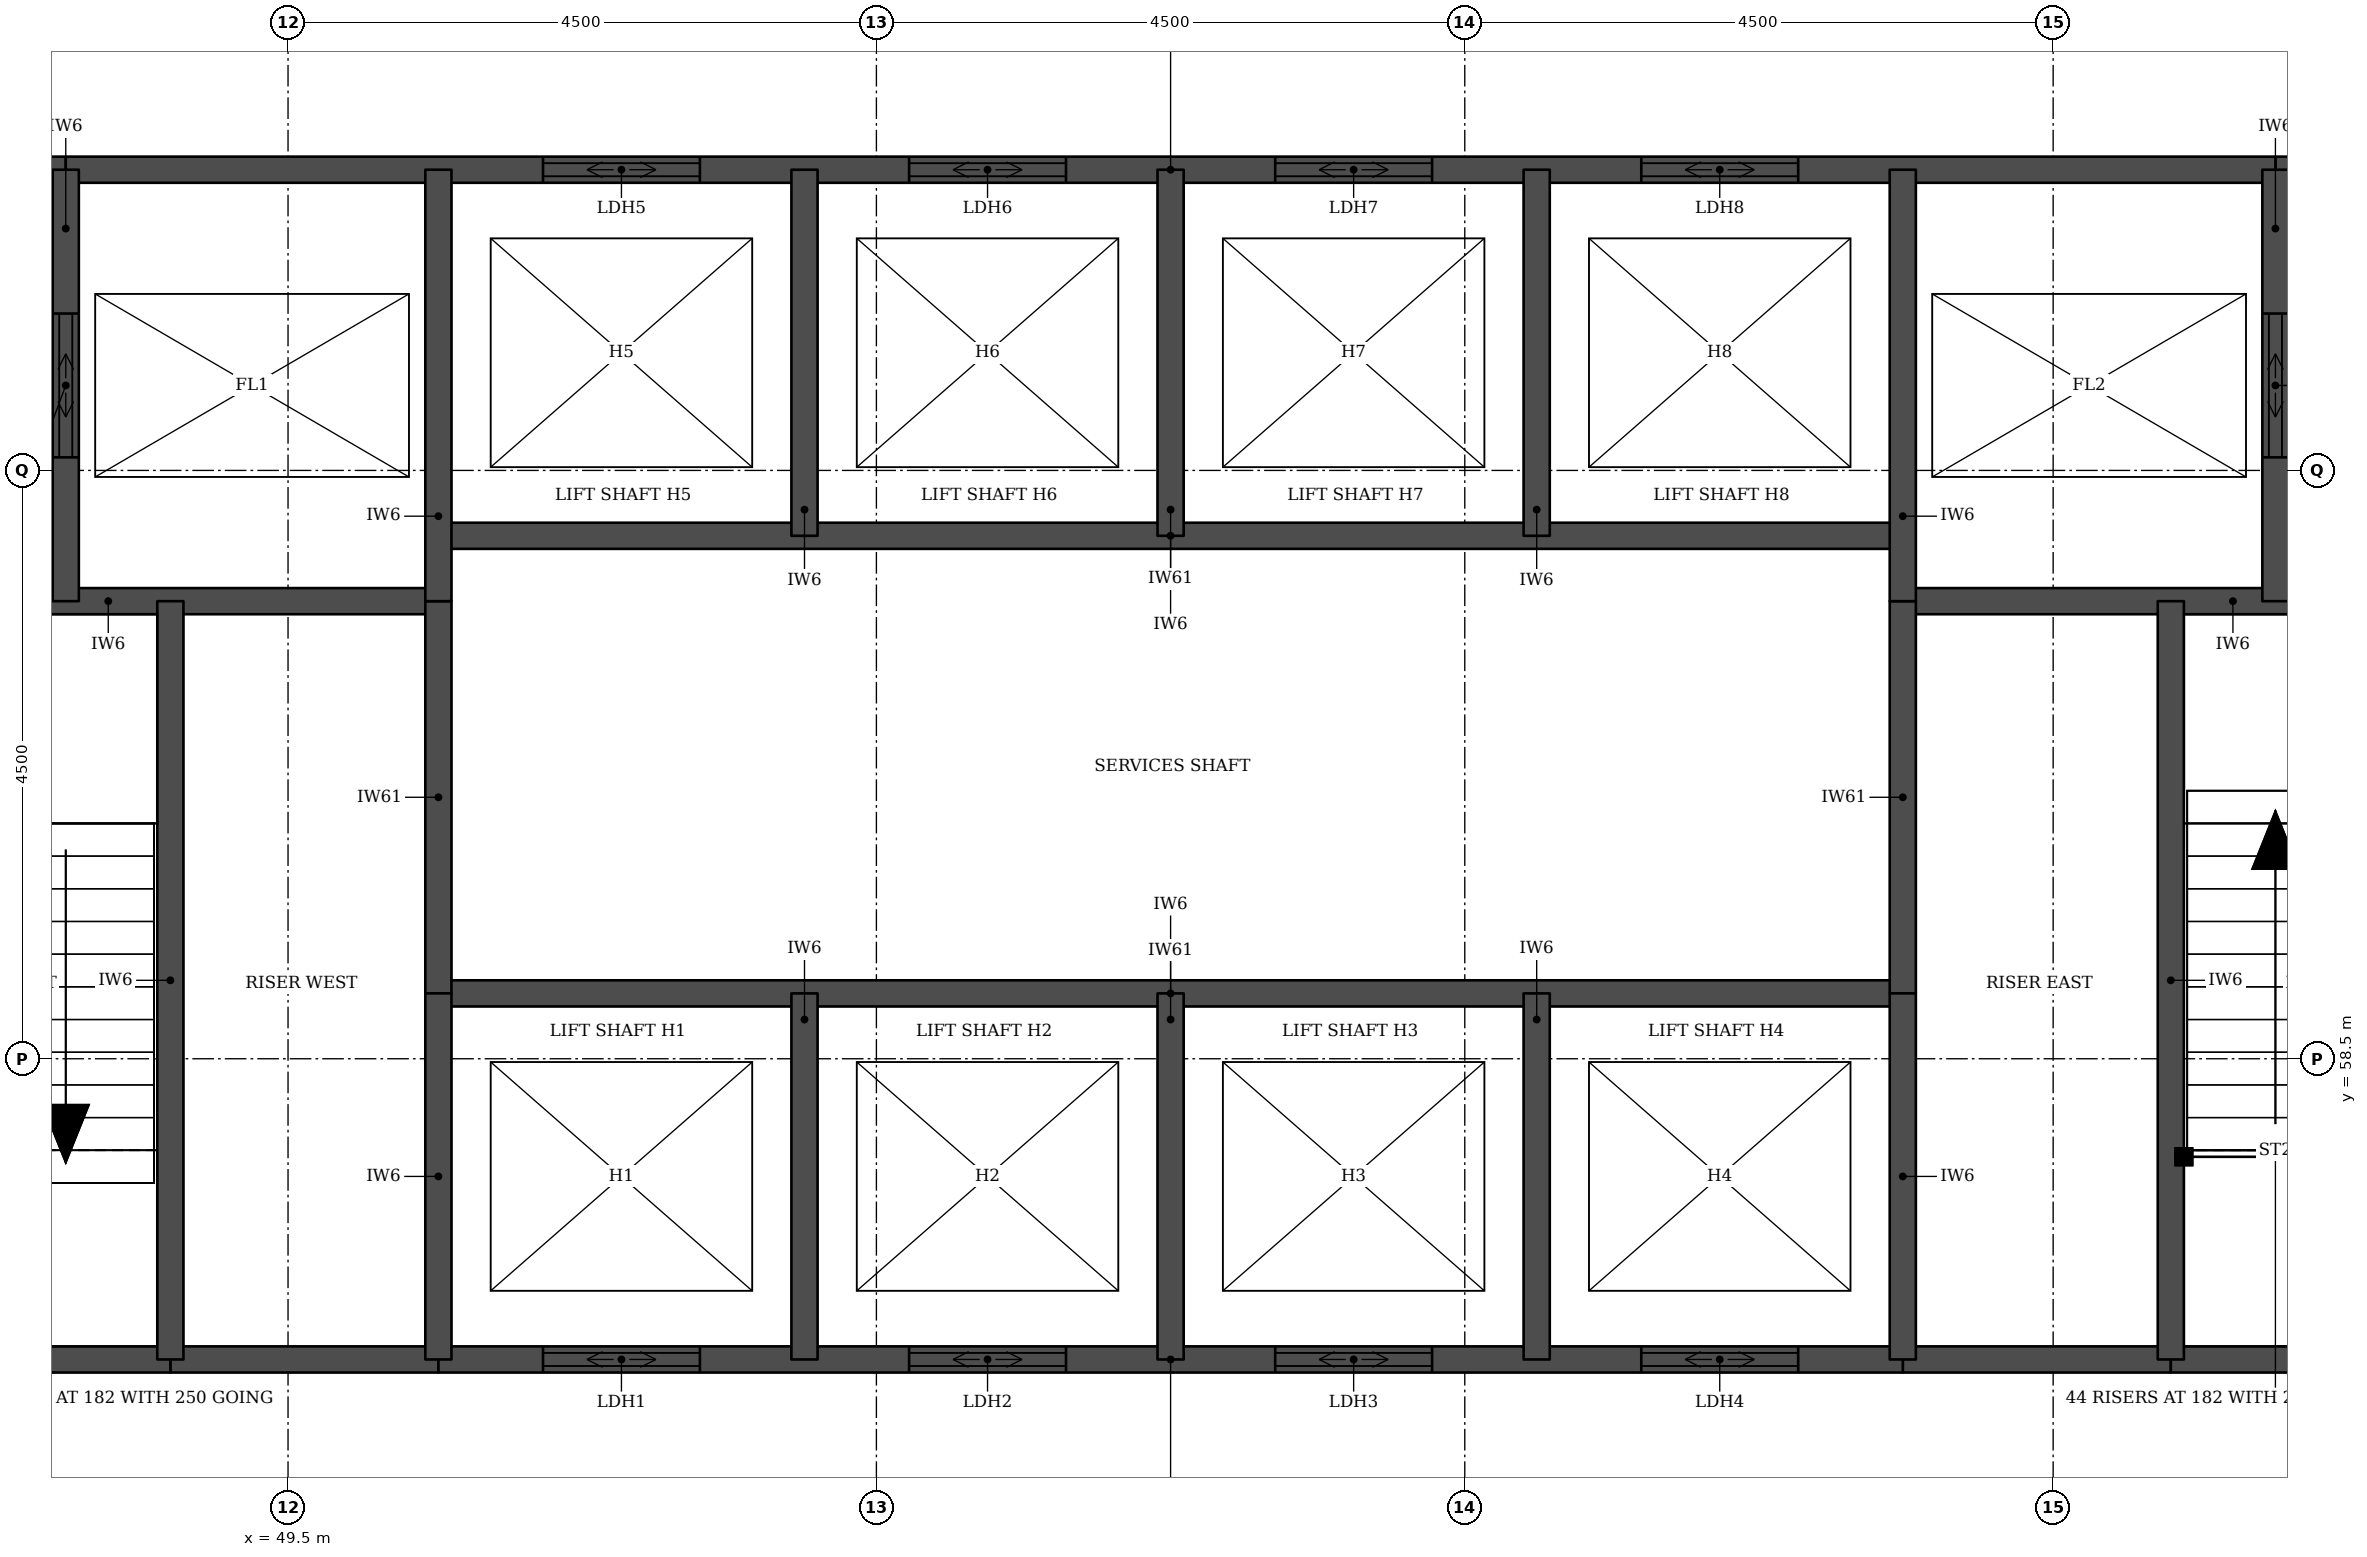
"""IFC4 building model, lengths in metres.
Left out: names, types, materials, properties, quantities, classifications, styles, units other than length and angle.
Written with IfcOpenShell. Run it as: python <this file> out.ifc"""

import sys

from ifc_helpers import new_model, si_unit, direction, frame, frame_2d, origin, place, context, subcontext, project, spatial, rectangle, extrude, element, fill, save


model = new_model("IFC4")
c1 = context("Model", 3, precision=1e-05, world=origin(), true_north=direction((0.0, 1.0)))
c2 = subcontext(c1, "Body", "Model", "MODEL_VIEW")
j1 = project(units=[si_unit("LENGTHUNIT", "METRE"), si_unit("PLANEANGLEUNIT", "RADIAN")], contexts=[c1])
p1 = place(None, origin())
s1 = spatial("IfcSite", under=j1, at=p1, CompositionType="ELEMENT")
p2 = place(p1, origin())
s2 = spatial("IfcBuilding", under=s1, at=p2, CompositionType="ELEMENT")
p3 = place(p2, origin())
s3 = spatial("IfcBuildingStorey", under=s2, at=p3, CompositionType="ELEMENT", Elevation=0.0)
for number, where, z_axis, x_axis in (
    (1, (48.6, 56.2, 0.0), (0.0, 0.0, 1.0), (1.0, 0.0, 0.0)),
    (2, (61.85, 56.2, 0.0), (0.0, 0.0, 1.0), (1.0, 0.0, 0.0)),
):
    element("IfcWall", number, at=place(p3, frame(where, z_axis=z_axis, x_axis=x_axis)), inside=s3, PredefinedType="SOLIDWALL", context=c2, shape_type="SweptSolid", body=[
        extrude(rectangle(XDim=2.05, YDim=0.2, at=frame_2d((1.025, 0.0))), origin(), (0.0, 0.0, 1.0), 7.65),
    ])
p4 = place(p3, frame((45.6, 56.2, 0.0), z_axis=(0.0, 0.0, 1.0), x_axis=(1.0, 0.0, 0.0)))
e3 = element("IfcWall", 3, at=p4, inside=s3, PredefinedType="SOLIDWALL", context=c2, shape_type="SweptSolid", body=[
    extrude(rectangle(XDim=3.0, YDim=0.2, at=frame_2d((1.5, 0.0))), origin(), (0.0, 0.0, 1.0), 7.65),
])
p5 = place(p3, frame((50.65, 56.2, 0.0), z_axis=(0.0, 0.0, 1.0), x_axis=(1.0, 0.0, 0.0)))
e4 = element("IfcWall", 4, at=p5, inside=s3, PredefinedType="SOLIDWALL", context=c2, shape_type="SweptSolid", body=[
    extrude(rectangle(XDim=11.2, YDim=0.2, at=frame_2d((5.6, 0.0))), origin(), (0.0, 0.0, 1.0), 7.65),
])
p6 = place(p5, frame((0.8, 0.0, 0.0)))
e5 = element("IfcOpeningElement", 5, at=p6, cuts=e4, PredefinedType="OPENING", context=c2, shape_type="SweptSolid", body=[
    extrude(rectangle(XDim=1.2, YDim=2.1, at=frame_2d((0.6, 1.05))), frame((0.0, 0.11, 0.0), z_axis=(0.0, -1.0, 0.0), x_axis=(1.0, 0.0, 0.0)), (0.0, 0.0, 1.0), 0.22),
])
p7 = place(p5, frame((3.6, 0.0, 0.0)))
e6 = element("IfcOpeningElement", 6, at=p7, cuts=e4, PredefinedType="OPENING", context=c2, shape_type="SweptSolid", body=[
    extrude(rectangle(XDim=1.2, YDim=2.1, at=frame_2d((0.6, 1.05))), frame((0.0, 0.11, 0.0), z_axis=(0.0, -1.0, 0.0), x_axis=(1.0, 0.0, 0.0)), (0.0, 0.0, 1.0), 0.22),
])
p8 = place(p5, frame((6.4, 0.0, 0.0)))
e7 = element("IfcOpeningElement", 7, at=p8, cuts=e4, PredefinedType="OPENING", context=c2, shape_type="SweptSolid", body=[
    extrude(rectangle(XDim=1.2, YDim=2.1, at=frame_2d((0.6, 1.05))), frame((0.0, 0.11, 0.0), z_axis=(0.0, -1.0, 0.0), x_axis=(1.0, 0.0, 0.0)), (0.0, 0.0, 1.0), 0.22),
])
p9 = place(p5, frame((9.2, 0.0, 0.0)))
e8 = element("IfcOpeningElement", 8, at=p9, cuts=e4, PredefinedType="OPENING", context=c2, shape_type="SweptSolid", body=[
    extrude(rectangle(XDim=1.2, YDim=2.1, at=frame_2d((0.6, 1.05))), frame((0.0, 0.11, 0.0), z_axis=(0.0, -1.0, 0.0), x_axis=(1.0, 0.0, 0.0)), (0.0, 0.0, 1.0), 0.22),
])
p10 = place(p3, frame((63.9, 56.2, 0.0), z_axis=(0.0, 0.0, 1.0), x_axis=(1.0, 0.0, 0.0)))
e9 = element("IfcWall", 9, at=p10, inside=s3, PredefinedType="SOLIDWALL", context=c2, shape_type="SweptSolid", body=[
    extrude(rectangle(XDim=3.0, YDim=0.2, at=frame_2d((1.5, 0.0))), origin(), (0.0, 0.0, 1.0), 7.65),
])
p11 = place(p3, frame((50.65, 59.0, 0.0), z_axis=(0.0, 0.0, 1.0), x_axis=(1.0, 0.0, 0.0)))
e10 = element("IfcWall", 10, at=p11, inside=s3, PredefinedType="SOLIDWALL", context=c2, shape_type="SweptSolid", body=[
    extrude(rectangle(XDim=11.2, YDim=0.2, at=frame_2d((5.6, 0.0))), origin(), (0.0, 0.0, 1.0), 8.0),
])
for number, where, z_axis, x_axis in (
    (11, (45.6, 62.0, 0.0), (0.0, 0.0, 1.0), (1.0, 0.0, 0.0)),
    (12, (61.85, 62.0, 0.0), (0.0, 0.0, 1.0), (1.0, 0.0, 0.0)),
):
    element("IfcWall", number, at=place(p3, frame(where, z_axis=z_axis, x_axis=x_axis)), inside=s3, PredefinedType="SOLIDWALL", context=c2, shape_type="SweptSolid", body=[
        extrude(rectangle(XDim=5.05, YDim=0.2, at=frame_2d((2.525, 0.0))), origin(), (0.0, 0.0, 1.0), 7.65),
    ])
p12 = place(p3, frame((50.65, 62.5, 0.0), z_axis=(0.0, 0.0, 1.0), x_axis=(1.0, 0.0, 0.0)))
e13 = element("IfcWall", 13, at=p12, inside=s3, PredefinedType="SOLIDWALL", context=c2, shape_type="SweptSolid", body=[
    extrude(rectangle(XDim=11.2, YDim=0.2, at=frame_2d((5.6, 0.0))), origin(), (0.0, 0.0, 1.0), 8.0),
])
for number, where, z_axis, x_axis in (
    (14, (45.6, 65.3, 0.0), (0.0, 0.0, 1.0), (1.0, 0.0, 0.0)),
    (15, (64.7, 65.3, 0.0), (0.0, 0.0, 1.0), (1.0, 0.0, 0.0)),
):
    element("IfcWall", number, at=place(p3, frame(where, z_axis=z_axis, x_axis=x_axis)), inside=s3, PredefinedType="SOLIDWALL", context=c2, shape_type="SweptSolid", body=[
        extrude(rectangle(XDim=2.2, YDim=0.2, at=frame_2d((1.1, 0.0))), origin(), (0.0, 0.0, 1.0), 7.65),
    ])
p13 = place(p3, frame((47.8, 65.3, 0.0), z_axis=(0.0, 0.0, 1.0), x_axis=(1.0, 0.0, 0.0)))
e16 = element("IfcWall", 16, at=p13, inside=s3, PredefinedType="SOLIDWALL", context=c2, shape_type="SweptSolid", body=[
    extrude(rectangle(XDim=16.9, YDim=0.2, at=frame_2d((8.45, 0.0))), origin(), (0.0, 0.0, 1.0), 7.65),
])
p14 = place(p13, frame((3.65, 0.0, 0.0)))
e17 = element("IfcOpeningElement", 17, at=p14, cuts=e16, PredefinedType="OPENING", context=c2, shape_type="SweptSolid", body=[
    extrude(rectangle(XDim=1.2, YDim=2.1, at=frame_2d((0.6, 1.05))), frame((0.0, 0.11, 0.0), z_axis=(0.0, -1.0, 0.0), x_axis=(1.0, 0.0, 0.0)), (0.0, 0.0, 1.0), 0.22),
])
p15 = place(p13, frame((6.45, 0.0, 0.0)))
e18 = element("IfcOpeningElement", 18, at=p15, cuts=e16, PredefinedType="OPENING", context=c2, shape_type="SweptSolid", body=[
    extrude(rectangle(XDim=1.2, YDim=2.1, at=frame_2d((0.6, 1.05))), frame((0.0, 0.11, 0.0), z_axis=(0.0, -1.0, 0.0), x_axis=(1.0, 0.0, 0.0)), (0.0, 0.0, 1.0), 0.22),
])
p16 = place(p13, frame((9.25, 0.0, 0.0)))
e19 = element("IfcOpeningElement", 19, at=p16, cuts=e16, PredefinedType="OPENING", context=c2, shape_type="SweptSolid", body=[
    extrude(rectangle(XDim=1.2, YDim=2.1, at=frame_2d((0.6, 1.05))), frame((0.0, 0.11, 0.0), z_axis=(0.0, -1.0, 0.0), x_axis=(1.0, 0.0, 0.0)), (0.0, 0.0, 1.0), 0.22),
])
p17 = place(p13, frame((12.05, 0.0, 0.0)))
e20 = element("IfcOpeningElement", 20, at=p17, cuts=e16, PredefinedType="OPENING", context=c2, shape_type="SweptSolid", body=[
    extrude(rectangle(XDim=1.2, YDim=2.1, at=frame_2d((0.6, 1.05))), frame((0.0, 0.11, 0.0), z_axis=(0.0, -1.0, 0.0), x_axis=(1.0, 0.0, 0.0)), (0.0, 0.0, 1.0), 0.22),
])
p18 = place(p3, frame((47.8, 62.0, 0.0), z_axis=(0.0, 0.0, 1.0), x_axis=(0.0, 1.0, 0.0)))
e21 = element("IfcWall", 21, at=p18, inside=s3, PredefinedType="SOLIDWALL", context=c2, shape_type="SweptSolid", body=[
    extrude(rectangle(XDim=3.3, YDim=0.2, at=frame_2d((1.65, 0.0))), origin(), (0.0, 0.0, 1.0), 7.65),
])
p19 = place(p18, frame((1.1, 0.0, 0.0)))
e22 = element("IfcOpeningElement", 22, at=p19, cuts=e21, PredefinedType="OPENING", context=c2, shape_type="SweptSolid", body=[
    extrude(rectangle(XDim=1.1, YDim=2.1, at=frame_2d((0.55, 1.05))), frame((0.0, 0.11, 0.0), z_axis=(0.0, -1.0, 0.0), x_axis=(1.0, 0.0, 0.0)), (0.0, 0.0, 1.0), 0.22),
])
p20 = place(p3, frame((48.6, 56.2, 0.0), z_axis=(0.0, 0.0, 1.0), x_axis=(0.0, 1.0, 0.0)))
e23 = element("IfcWall", 23, at=p20, inside=s3, PredefinedType="SOLIDWALL", context=c2, shape_type="SweptSolid", body=[
    extrude(rectangle(XDim=5.8, YDim=0.2, at=frame_2d((2.9, 0.0))), origin(), (0.0, 0.0, 1.0), 7.65),
])
p21 = place(p3, frame((50.65, 59.0, 0.0), z_axis=(0.0, 0.0, 1.0), x_axis=(0.0, 1.0, 0.0)))
e24 = element("IfcWall", 24, at=p21, inside=s3, PredefinedType="SOLIDWALL", context=c2, shape_type="SweptSolid", body=[
    extrude(rectangle(XDim=3.0, YDim=0.2, at=frame_2d((1.5, 0.0))), origin(), (0.0, 0.0, 1.0), 8.0),
])
p22 = place(p3, frame((50.65, 56.2, 0.0), z_axis=(0.0, 0.0, 1.0), x_axis=(0.0, 1.0, 0.0)))
e25 = element("IfcWall", 25, at=p22, inside=s3, PredefinedType="SOLIDWALL", context=c2, shape_type="SweptSolid", body=[
    extrude(rectangle(XDim=2.8, YDim=0.2, at=frame_2d((1.4, 0.0))), origin(), (0.0, 0.0, 1.0), 7.65),
])
p23 = place(p3, frame((50.65, 62.0, 0.0), z_axis=(0.0, 0.0, 1.0), x_axis=(0.0, 1.0, 0.0)))
e26 = element("IfcWall", 26, at=p23, inside=s3, PredefinedType="SOLIDWALL", context=c2, shape_type="SweptSolid", body=[
    extrude(rectangle(XDim=3.3, YDim=0.2, at=frame_2d((1.65, 0.0))), origin(), (0.0, 0.0, 1.0), 7.65),
])
for number, where, z_axis, x_axis in (
    (27, (53.45, 56.2, 0.0), (0.0, 0.0, 1.0), (0.0, 1.0, 0.0)),
    (28, (53.45, 62.5, 0.0), (0.0, 0.0, 1.0), (0.0, 1.0, 0.0)),
    (29, (56.25, 56.2, 0.0), (0.0, 0.0, 1.0), (0.0, 1.0, 0.0)),
    (30, (56.25, 62.5, 0.0), (0.0, 0.0, 1.0), (0.0, 1.0, 0.0)),
    (31, (59.05, 56.2, 0.0), (0.0, 0.0, 1.0), (0.0, 1.0, 0.0)),
    (32, (59.05, 62.5, 0.0), (0.0, 0.0, 1.0), (0.0, 1.0, 0.0)),
):
    element("IfcWall", number, at=place(p3, frame(where, z_axis=z_axis, x_axis=x_axis)), inside=s3, PredefinedType="SOLIDWALL", context=c2, shape_type="SweptSolid", body=[
        extrude(rectangle(XDim=2.8, YDim=0.2, at=frame_2d((1.4, 0.0))), origin(), (0.0, 0.0, 1.0), 7.65),
    ])
p24 = place(p3, frame((61.85, 59.0, 0.0), z_axis=(0.0, 0.0, 1.0), x_axis=(0.0, 1.0, 0.0)))
e33 = element("IfcWall", 33, at=p24, inside=s3, PredefinedType="SOLIDWALL", context=c2, shape_type="SweptSolid", body=[
    extrude(rectangle(XDim=3.0, YDim=0.2, at=frame_2d((1.5, 0.0))), origin(), (0.0, 0.0, 1.0), 8.0),
])
p25 = place(p3, frame((61.85, 56.2, 0.0), z_axis=(0.0, 0.0, 1.0), x_axis=(0.0, 1.0, 0.0)))
e34 = element("IfcWall", 34, at=p25, inside=s3, PredefinedType="SOLIDWALL", context=c2, shape_type="SweptSolid", body=[
    extrude(rectangle(XDim=2.8, YDim=0.2, at=frame_2d((1.4, 0.0))), origin(), (0.0, 0.0, 1.0), 7.65),
])
p26 = place(p3, frame((61.85, 62.0, 0.0), z_axis=(0.0, 0.0, 1.0), x_axis=(0.0, 1.0, 0.0)))
e35 = element("IfcWall", 35, at=p26, inside=s3, PredefinedType="SOLIDWALL", context=c2, shape_type="SweptSolid", body=[
    extrude(rectangle(XDim=3.3, YDim=0.2, at=frame_2d((1.65, 0.0))), origin(), (0.0, 0.0, 1.0), 7.65),
])
p27 = place(p3, frame((63.9, 56.2, 0.0), z_axis=(0.0, 0.0, 1.0), x_axis=(0.0, 1.0, 0.0)))
e36 = element("IfcWall", 36, at=p27, inside=s3, PredefinedType="SOLIDWALL", context=c2, shape_type="SweptSolid", body=[
    extrude(rectangle(XDim=5.8, YDim=0.2, at=frame_2d((2.9, 0.0))), origin(), (0.0, 0.0, 1.0), 7.65),
])
p28 = place(p3, frame((64.7, 62.0, 0.0), z_axis=(0.0, 0.0, 1.0), x_axis=(0.0, 1.0, 0.0)))
e37 = element("IfcWall", 37, at=p28, inside=s3, PredefinedType="SOLIDWALL", context=c2, shape_type="SweptSolid", body=[
    extrude(rectangle(XDim=3.3, YDim=0.2, at=frame_2d((1.65, 0.0))), origin(), (0.0, 0.0, 1.0), 7.65),
])
p29 = place(p28, frame((1.1, 0.0, 0.0)))
e38 = element("IfcOpeningElement", 38, at=p29, cuts=e37, PredefinedType="OPENING", context=c2, shape_type="SweptSolid", body=[
    extrude(rectangle(XDim=1.1, YDim=2.1, at=frame_2d((0.55, 1.05))), frame((0.0, 0.11, 0.0), z_axis=(0.0, -1.0, 0.0), x_axis=(1.0, 0.0, 0.0)), (0.0, 0.0, 1.0), 0.22),
])
p30 = place(p6, origin())
e39 = element("IfcDoor", 39, at=p30, inside=s3, OperationType="DOUBLE_DOOR_SLIDING", PredefinedType="DOOR", context=c2, shape_type="SweptSolid", body=[
    extrude(rectangle(XDim=1.2, YDim=2.1, at=frame_2d((0.6, 1.05))), frame((0.0, 0.025, 0.0), z_axis=(0.0, -1.0, 0.0), x_axis=(1.0, 0.0, 0.0)), (0.0, 0.0, 1.0), 0.05),
])
fill(e5, e39)
p31 = place(p7, origin())
e40 = element("IfcDoor", 40, at=p31, inside=s3, OperationType="DOUBLE_DOOR_SLIDING", PredefinedType="DOOR", context=c2, shape_type="SweptSolid", body=[
    extrude(rectangle(XDim=1.2, YDim=2.1, at=frame_2d((0.6, 1.05))), frame((0.0, 0.025, 0.0), z_axis=(0.0, -1.0, 0.0), x_axis=(1.0, 0.0, 0.0)), (0.0, 0.0, 1.0), 0.05),
])
fill(e6, e40)
p32 = place(p8, origin())
e41 = element("IfcDoor", 41, at=p32, inside=s3, OperationType="DOUBLE_DOOR_SLIDING", PredefinedType="DOOR", context=c2, shape_type="SweptSolid", body=[
    extrude(rectangle(XDim=1.2, YDim=2.1, at=frame_2d((0.6, 1.05))), frame((0.0, 0.025, 0.0), z_axis=(0.0, -1.0, 0.0), x_axis=(1.0, 0.0, 0.0)), (0.0, 0.0, 1.0), 0.05),
])
fill(e7, e41)
p33 = place(p9, origin())
e42 = element("IfcDoor", 42, at=p33, inside=s3, OperationType="DOUBLE_DOOR_SLIDING", PredefinedType="DOOR", context=c2, shape_type="SweptSolid", body=[
    extrude(rectangle(XDim=1.2, YDim=2.1, at=frame_2d((0.6, 1.05))), frame((0.0, 0.025, 0.0), z_axis=(0.0, -1.0, 0.0), x_axis=(1.0, 0.0, 0.0)), (0.0, 0.0, 1.0), 0.05),
])
fill(e8, e42)
p34 = place(p14, origin())
e43 = element("IfcDoor", 43, at=p34, inside=s3, OperationType="DOUBLE_DOOR_SLIDING", PredefinedType="DOOR", context=c2, shape_type="SweptSolid", body=[
    extrude(rectangle(XDim=1.2, YDim=2.1, at=frame_2d((0.6, 1.05))), frame((0.0, 0.025, 0.0), z_axis=(0.0, -1.0, 0.0), x_axis=(1.0, 0.0, 0.0)), (0.0, 0.0, 1.0), 0.05),
])
fill(e17, e43)
p35 = place(p15, origin())
e44 = element("IfcDoor", 44, at=p35, inside=s3, OperationType="DOUBLE_DOOR_SLIDING", PredefinedType="DOOR", context=c2, shape_type="SweptSolid", body=[
    extrude(rectangle(XDim=1.2, YDim=2.1, at=frame_2d((0.6, 1.05))), frame((0.0, 0.025, 0.0), z_axis=(0.0, -1.0, 0.0), x_axis=(1.0, 0.0, 0.0)), (0.0, 0.0, 1.0), 0.05),
])
fill(e18, e44)
p36 = place(p16, origin())
e45 = element("IfcDoor", 45, at=p36, inside=s3, OperationType="DOUBLE_DOOR_SLIDING", PredefinedType="DOOR", context=c2, shape_type="SweptSolid", body=[
    extrude(rectangle(XDim=1.2, YDim=2.1, at=frame_2d((0.6, 1.05))), frame((0.0, 0.025, 0.0), z_axis=(0.0, -1.0, 0.0), x_axis=(1.0, 0.0, 0.0)), (0.0, 0.0, 1.0), 0.05),
])
fill(e19, e45)
p37 = place(p17, origin())
e46 = element("IfcDoor", 46, at=p37, inside=s3, OperationType="DOUBLE_DOOR_SLIDING", PredefinedType="DOOR", context=c2, shape_type="SweptSolid", body=[
    extrude(rectangle(XDim=1.2, YDim=2.1, at=frame_2d((0.6, 1.05))), frame((0.0, 0.025, 0.0), z_axis=(0.0, -1.0, 0.0), x_axis=(1.0, 0.0, 0.0)), (0.0, 0.0, 1.0), 0.05),
])
fill(e20, e46)
p38 = place(p19, origin())
e47 = element("IfcDoor", 47, at=p38, inside=s3, OperationType="DOUBLE_DOOR_SLIDING", PredefinedType="DOOR", context=c2, shape_type="SweptSolid", body=[
    extrude(rectangle(XDim=1.1, YDim=2.1, at=frame_2d((0.55, 1.05))), frame((0.0, 0.025, 0.0), z_axis=(0.0, -1.0, 0.0), x_axis=(1.0, 0.0, 0.0)), (0.0, 0.0, 1.0), 0.05),
])
fill(e22, e47)
p39 = place(p29, origin())
e48 = element("IfcDoor", 48, at=p39, inside=s3, OperationType="DOUBLE_DOOR_SLIDING", PredefinedType="DOOR", context=c2, shape_type="SweptSolid", body=[
    extrude(rectangle(XDim=1.1, YDim=2.1, at=frame_2d((0.55, 1.05))), frame((0.0, 0.025, 0.0), z_axis=(0.0, -1.0, 0.0), x_axis=(1.0, 0.0, 0.0)), (0.0, 0.0, 1.0), 0.05),
])
fill(e38, e48)
save(model, sys.argv[1])
